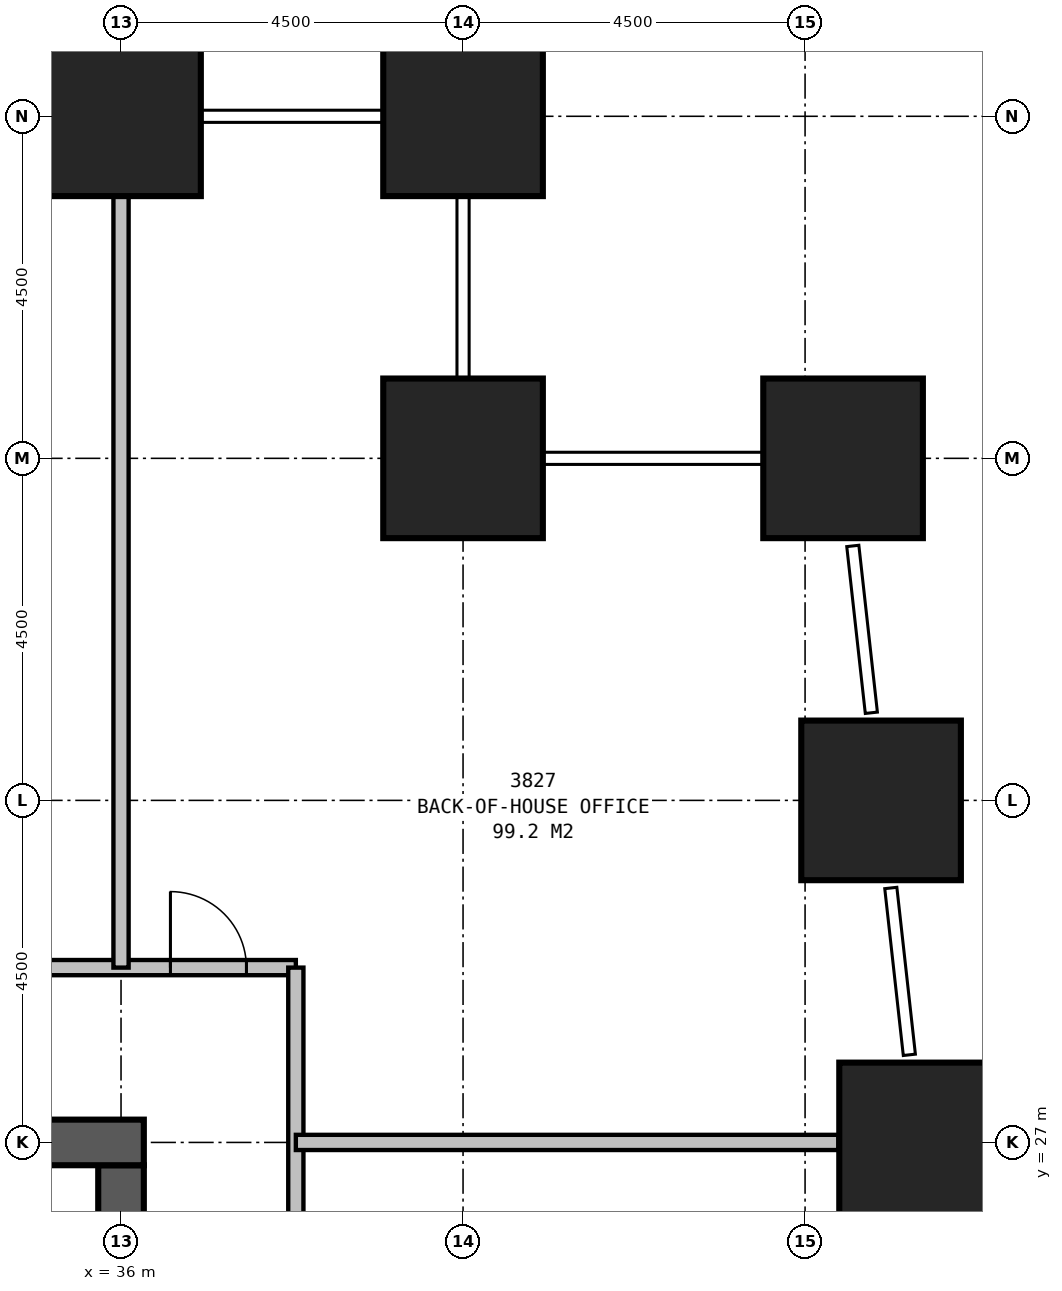
"""IFC4 building model, lengths in metres.
Left out: names, types, materials, properties, quantities, classifications, styles, units other than length and angle.
Written with IfcOpenShell. Run it as: python <this file> out.ifc"""

import sys

from ifc_helpers import new_model, si_unit, direction, frame, frame_2d, origin, origin_2d, place, context, subcontext, project, spatial, rectangle, extrude, element, fill, save


model = new_model("IFC4")
c1 = context("Model", 3, precision=1e-05, world=origin(), true_north=direction((0.0, 1.0)))
c2 = subcontext(c1, "Body", "Model", "MODEL_VIEW")
j1 = project(units=[si_unit("LENGTHUNIT", "METRE"), si_unit("PLANEANGLEUNIT", "RADIAN")], contexts=[c1])
p1 = place(None, origin())
s1 = spatial("IfcSite", under=j1, at=p1, CompositionType="ELEMENT")
p2 = place(p1, origin())
s2 = spatial("IfcBuilding", under=s1, at=p2, CompositionType="ELEMENT")
p3 = place(p2, frame((0.0, 0.0, 145.9)))
s3 = spatial("IfcBuildingStorey", under=s2, at=p3, CompositionType="ELEMENT", Elevation=145.9)
for number, where, z_axis, x_axis in (
    (1, (46.5, 27.0, 0.0), (0.0, 0.0, 1.0), (1.0, 0.0, 0.0)),
    (2, (46.0, 31.5, 0.0), (0.0, 0.0, 1.0), (1.0, 0.0, 0.0)),
    (3, (45.5, 36.0, 0.0), (0.0, 0.0, 1.0), (1.0, 0.0, 0.0)),
    (4, (40.5, 36.0, 0.0), (0.0, 0.0, 1.0), (1.0, 0.0, 0.0)),
    (5, (40.5, 40.5, 0.0), (0.0, 0.0, 1.0), (1.0, 0.0, 0.0)),
    (6, (36.0, 40.5, 0.0), (0.0, 0.0, 1.0), (1.0, 0.0, 0.0)),
):
    element("IfcColumn", number, at=place(p3, frame(where, z_axis=z_axis, x_axis=x_axis)), inside=s3, PredefinedType="COLUMN", context=c2, shape_type="SweptSolid", body=[
        extrude(rectangle(XDim=2.1, YDim=2.1, at=origin_2d()), origin(), (0.0, 0.0, 1.0), 6.0),
    ])
p4 = place(p3, frame((36.3, 27.0, 0.0), z_axis=(0.0, 0.0, 1.0), x_axis=(-1.0, 0.0, 0.0)))
e7 = element("IfcWall", 7, at=p4, inside=s3, PredefinedType="SHEAR", context=c2, shape_type="SweptSolid", body=[
    extrude(rectangle(XDim=23.1, YDim=0.6, at=frame_2d((11.55, 0.0))), origin(), (0.0, 0.0, 1.0), 6.0),
])
p5 = place(p4, frame((17.05, 0.0, 0.0)))
e8 = element("IfcOpeningElement", 8, at=p5, cuts=e7, PredefinedType="OPENING", context=c2, shape_type="SweptSolid", body=[
    extrude(rectangle(XDim=1.0, YDim=2.1, at=frame_2d((0.5, 1.05))), frame((0.0, 0.31, 0.0), z_axis=(0.0, -1.0, 0.0), x_axis=(1.0, 0.0, 0.0)), (0.0, 0.0, 1.0), 0.62),
])
p6 = place(p4, frame((12.05, 0.0, 0.0)))
e9 = element("IfcOpeningElement", 9, at=p6, cuts=e7, PredefinedType="OPENING", context=c2, shape_type="SweptSolid", body=[
    extrude(rectangle(XDim=1.0, YDim=2.1, at=frame_2d((0.5, 1.05))), frame((0.0, 0.31, 0.0), z_axis=(0.0, -1.0, 0.0), x_axis=(1.0, 0.0, 0.0)), (0.0, 0.0, 1.0), 0.62),
])
p7 = place(p4, frame((7.05, 0.0, 0.0)))
e10 = element("IfcOpeningElement", 10, at=p7, cuts=e7, PredefinedType="OPENING", context=c2, shape_type="SweptSolid", body=[
    extrude(rectangle(XDim=1.0, YDim=2.1, at=frame_2d((0.5, 1.05))), frame((0.0, 0.31, 0.0), z_axis=(0.0, -1.0, 0.0), x_axis=(1.0, 0.0, 0.0)), (0.0, 0.0, 1.0), 0.62),
])
p8 = place(p3, frame((36.0, 20.0, 0.0), z_axis=(0.0, 0.0, 1.0), x_axis=(0.0, 1.0, 0.0)))
e11 = element("IfcWall", 11, at=p8, inside=s3, PredefinedType="SHEAR", context=c2, shape_type="SweptSolid", body=[
    extrude(rectangle(XDim=6.7, YDim=0.6, at=frame_2d((3.35, 0.0))), origin(), (0.0, 0.0, 1.0), 6.0),
])
p9 = place(p3, frame((38.3, 11.2, 0.0), z_axis=(0.0, 0.0, 1.0), x_axis=(0.0, 1.0, 0.0)))
e12 = element("IfcWall", 12, at=p9, inside=s3, PredefinedType="PARTITIONING", context=c2, shape_type="SweptSolid", body=[
    extrude(rectangle(XDim=18.1, YDim=0.2, at=frame_2d((9.05, 0.0))), origin(), (0.0, 0.0, 1.0), 5.7),
])
p10 = place(p9, frame((4.3, 0.0, 0.0), z_axis=(0.0, 0.0, 1.0), x_axis=(-1.0, 0.0, 0.0)))
e13 = element("IfcOpeningElement", 13, at=p10, cuts=e12, PredefinedType="OPENING", context=c2, shape_type="SweptSolid", body=[
    extrude(rectangle(XDim=1.0, YDim=2.1, at=frame_2d((0.5, 1.05))), frame((0.0, 0.11, 0.0), z_axis=(0.0, -1.0, 0.0), x_axis=(1.0, 0.0, 0.0)), (0.0, 0.0, 1.0), 0.22),
])
p11 = place(p9, frame((7.3, 0.0, 0.0), z_axis=(0.0, 0.0, 1.0), x_axis=(-1.0, 0.0, 0.0)))
e14 = element("IfcOpeningElement", 14, at=p11, cuts=e12, PredefinedType="OPENING", context=c2, shape_type="SweptSolid", body=[
    extrude(rectangle(XDim=1.0, YDim=2.1, at=frame_2d((0.5, 1.05))), frame((0.0, 0.11, 0.0), z_axis=(0.0, -1.0, 0.0), x_axis=(1.0, 0.0, 0.0)), (0.0, 0.0, 1.0), 0.22),
])
p12 = place(p9, frame((9.7, 0.0, 0.0), z_axis=(0.0, 0.0, 1.0), x_axis=(-1.0, 0.0, 0.0)))
e15 = element("IfcOpeningElement", 15, at=p12, cuts=e12, PredefinedType="OPENING", context=c2, shape_type="SweptSolid", body=[
    extrude(rectangle(XDim=1.0, YDim=2.1, at=frame_2d((0.5, 1.05))), frame((0.0, 0.11, 0.0), z_axis=(0.0, -1.0, 0.0), x_axis=(1.0, 0.0, 0.0)), (0.0, 0.0, 1.0), 0.22),
])
p13 = place(p9, frame((12.75, 0.0, 0.0), z_axis=(0.0, 0.0, 1.0), x_axis=(-1.0, 0.0, 0.0)))
e16 = element("IfcOpeningElement", 16, at=p13, cuts=e12, PredefinedType="OPENING", context=c2, shape_type="SweptSolid", body=[
    extrude(rectangle(XDim=1.0, YDim=2.1, at=frame_2d((0.5, 1.05))), frame((0.0, 0.11, 0.0), z_axis=(0.0, -1.0, 0.0), x_axis=(1.0, 0.0, 0.0)), (0.0, 0.0, 1.0), 0.22),
])
p14 = place(p3, frame((11.2, 29.3, 0.0), z_axis=(0.0, 0.0, 1.0), x_axis=(1.0, 0.0, 0.0)))
e17 = element("IfcWall", 17, at=p14, inside=s3, PredefinedType="PARTITIONING", context=c2, shape_type="SweptSolid", body=[
    extrude(rectangle(XDim=27.1, YDim=0.2, at=frame_2d((13.55, 0.0))), origin(), (0.0, 0.0, 1.0), 5.7),
])
p15 = place(p14, frame((2.9, 0.0, 0.0)))
e18 = element("IfcOpeningElement", 18, at=p15, cuts=e17, PredefinedType="OPENING", context=c2, shape_type="SweptSolid", body=[
    extrude(rectangle(XDim=1.0, YDim=2.1, at=frame_2d((0.5, 1.05))), frame((0.0, 0.11, 0.0), z_axis=(0.0, -1.0, 0.0), x_axis=(1.0, 0.0, 0.0)), (0.0, 0.0, 1.0), 0.22),
])
p16 = place(p14, frame((5.15, 0.0, 0.0)))
e19 = element("IfcOpeningElement", 19, at=p16, cuts=e17, PredefinedType="OPENING", context=c2, shape_type="SweptSolid", body=[
    extrude(rectangle(XDim=1.0, YDim=2.1, at=frame_2d((0.5, 1.05))), frame((0.0, 0.11, 0.0), z_axis=(0.0, -1.0, 0.0), x_axis=(1.0, 0.0, 0.0)), (0.0, 0.0, 1.0), 0.22),
])
p17 = place(p14, frame((7.5, 0.0, 0.0)))
e20 = element("IfcOpeningElement", 20, at=p17, cuts=e17, PredefinedType="OPENING", context=c2, shape_type="SweptSolid", body=[
    extrude(rectangle(XDim=1.0, YDim=2.1, at=frame_2d((0.5, 1.05))), frame((0.0, 0.11, 0.0), z_axis=(0.0, -1.0, 0.0), x_axis=(1.0, 0.0, 0.0)), (0.0, 0.0, 1.0), 0.22),
])
p18 = place(p14, frame((9.6, 0.0, 0.0)))
e21 = element("IfcOpeningElement", 21, at=p18, cuts=e17, PredefinedType="OPENING", context=c2, shape_type="SweptSolid", body=[
    extrude(rectangle(XDim=1.0, YDim=2.1, at=frame_2d((0.5, 1.05))), frame((0.0, 0.11, 0.0), z_axis=(0.0, -1.0, 0.0), x_axis=(1.0, 0.0, 0.0)), (0.0, 0.0, 1.0), 0.22),
])
p19 = place(p14, frame((11.75, 0.0, 0.0)))
e22 = element("IfcOpeningElement", 22, at=p19, cuts=e17, PredefinedType="OPENING", context=c2, shape_type="SweptSolid", body=[
    extrude(rectangle(XDim=1.8, YDim=2.4, at=frame_2d((0.9, 1.2))), frame((0.0, 0.11, 0.0), z_axis=(0.0, -1.0, 0.0), x_axis=(1.0, 0.0, 0.0)), (0.0, 0.0, 1.0), 0.22),
])
p20 = place(p14, frame((2.05, 0.0, 0.0), z_axis=(0.0, 0.0, 1.0), x_axis=(-1.0, 0.0, 0.0)))
e23 = element("IfcOpeningElement", 23, at=p20, cuts=e17, PredefinedType="OPENING", context=c2, shape_type="SweptSolid", body=[
    extrude(rectangle(XDim=1.8, YDim=2.4, at=frame_2d((0.9, 1.2))), frame((0.0, 0.11, 0.0), z_axis=(0.0, -1.0, 0.0), x_axis=(1.0, 0.0, 0.0)), (0.0, 0.0, 1.0), 0.22),
])
p21 = place(p14, frame((25.45, 0.0, 0.0)))
e24 = element("IfcOpeningElement", 24, at=p21, cuts=e17, PredefinedType="OPENING", context=c2, shape_type="SweptSolid", body=[
    extrude(rectangle(XDim=1.0, YDim=2.1, at=frame_2d((0.5, 1.05))), frame((0.0, 0.11, 0.0), z_axis=(0.0, -1.0, 0.0), x_axis=(1.0, 0.0, 0.0)), (0.0, 0.0, 1.0), 0.22),
])
p22 = place(p3, frame((38.3, 27.0, 0.0), z_axis=(0.0, 0.0, 1.0), x_axis=(1.0, 0.0, 0.0)))
e25 = element("IfcWall", 25, at=p22, inside=s3, PredefinedType="PARTITIONING", context=c2, shape_type="SweptSolid", body=[
    extrude(rectangle(XDim=7.139, YDim=0.2, at=frame_2d((3.57, 0.0))), origin(), (0.0, 0.0, 1.0), 4.4),
])
p23 = place(p3, frame((36.0, 29.3, 0.0), z_axis=(0.0, 0.0, 1.0), x_axis=(0.0, 1.0, 0.0)))
e26 = element("IfcWall", 26, at=p23, inside=s3, PredefinedType="PARTITIONING", context=c2, shape_type="SweptSolid", body=[
    extrude(rectangle(XDim=10.15, YDim=0.2, at=frame_2d((5.075, 0.0))), origin(), (0.0, 0.0, 1.0), 4.7),
])
p24 = place(p21, origin())
e27 = element("IfcDoor", 27, at=p24, inside=s3, OperationType="SINGLE_SWING_LEFT", PredefinedType="DOOR", context=c2, shape_type="SweptSolid", body=[
    extrude(rectangle(XDim=1.0, YDim=2.1, at=frame_2d((0.5, 1.05))), frame((0.0, 0.025, 0.0), z_axis=(0.0, -1.0, 0.0), x_axis=(1.0, 0.0, 0.0)), (0.0, 0.0, 1.0), 0.05),
])
fill(e24, e27)
save(model, sys.argv[1])
